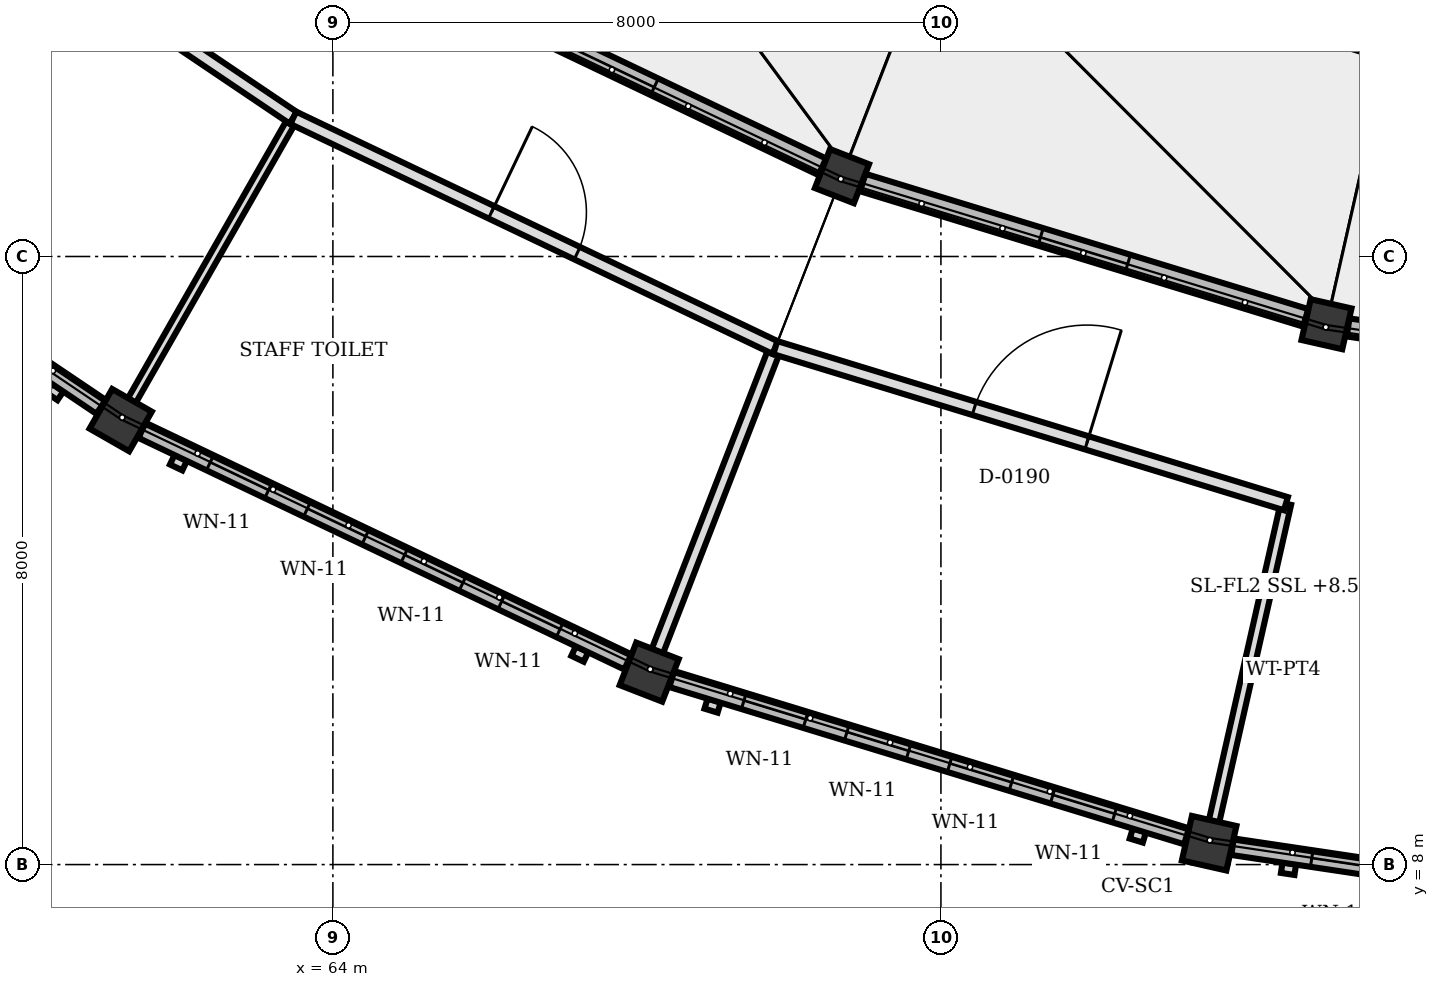
"""IFC4 building model, lengths in metres.
Left out: names, types, materials, properties, quantities, classifications, styles, units other than length and angle.
Written with IfcOpenShell. Run it as: python <this file> out.ifc"""

import sys

from ifc_helpers import new_model, si_unit, direction, frame, frame_2d, origin, origin_2d, place, context, subcontext, project, spatial, rectangle, extrude, element, fill, save


model = new_model("IFC4")
c1 = context("Model", 3, precision=1e-05, world=origin(), true_north=direction((0.0, 1.0)))
c2 = subcontext(c1, "Body", "Model", "MODEL_VIEW")
j1 = project(units=[si_unit("LENGTHUNIT", "METRE"), si_unit("PLANEANGLEUNIT", "RADIAN")], contexts=[c1])
p1 = place(None, origin())
s1 = spatial("IfcSite", under=j1, at=p1, CompositionType="ELEMENT")
p2 = place(p1, origin())
s2 = spatial("IfcBuilding", under=s1, at=p2, CompositionType="ELEMENT")
p3 = place(p2, frame((0.0, 0.0, 8.5)))
s3 = spatial("IfcBuildingStorey", under=s2, at=p3, CompositionType="ELEMENT", Elevation=8.5)
for number, where, z_axis, x_axis in (
    (1, (70.698, 17.057, 0.0), (0.0, 0.0, 1.0), (-0.362, -0.932, 0.0)),
    (2, (77.073, 15.109, 0.0), (0.0, 0.0, 1.0), (-0.221, -0.975, 0.0)),
):
    element("IfcColumn", number, at=place(p3, frame(where, z_axis=z_axis, x_axis=x_axis)), inside=s3, PredefinedType="COLUMN", context=c2, shape_type="SweptSolid", body=[
        extrude(rectangle(XDim=0.55, YDim=0.55, at=origin_2d()), origin(), (0.0, 0.0, 1.0), 4.0),
    ])
for number, where, z_axis, x_axis in (
    (3, (61.208, 13.847, 0.0), (0.0, 0.0, 1.0), (-0.496, -0.868, 0.0)),
    (4, (68.162, 10.532, 0.0), (0.0, 0.0, 1.0), (-0.362, -0.932, 0.0)),
    (5, (75.529, 8.281, 0.0), (0.0, 0.0, 1.0), (-0.221, -0.975, 0.0)),
):
    element("IfcColumn", number, at=place(p3, frame(where, z_axis=z_axis, x_axis=x_axis)), inside=s3, PredefinedType="COLUMN", context=c2, shape_type="SweptSolid", body=[
        extrude(rectangle(XDim=0.6, YDim=0.6, at=origin_2d()), origin(), (0.0, 0.0, 1.0), 4.0),
    ])
p4 = place(p3, frame((60.95, 14.021, 0.0), z_axis=(0.0, 0.0, 1.0), x_axis=(-0.829217797208, 0.558925616512, 0.0)))
e6 = element("IfcWall", 6, at=p4, inside=s3, PredefinedType="SOLIDWALL", context=c2, shape_type="SweptSolid", body=[
    extrude(rectangle(XDim=7.082, YDim=0.22, at=frame_2d((3.541, 0.0))), origin(), (0.0, 0.0, 1.0), 3.192),
])
p5 = place(p4, frame((0.991, 0.0, 0.85)))
e7 = element("IfcOpeningElement", 7, at=p5, cuts=e6, PredefinedType="OPENING", context=c2, shape_type="SweptSolid", body=[
    extrude(rectangle(XDim=0.85, YDim=1.25, at=frame_2d((0.425, 0.625))), frame((0.0, 0.12, 0.0), z_axis=(0.0, -1.0, 0.0), x_axis=(1.0, 0.0, 0.0)), (0.0, 0.0, 1.0), 0.24),
])
p6 = place(p4, frame((2.408, 0.0, 0.85)))
e8 = element("IfcOpeningElement", 8, at=p6, cuts=e6, PredefinedType="OPENING", context=c2, shape_type="SweptSolid", body=[
    extrude(rectangle(XDim=0.85, YDim=1.25, at=frame_2d((0.425, 0.625))), frame((0.0, 0.12, 0.0), z_axis=(0.0, -1.0, 0.0), x_axis=(1.0, 0.0, 0.0)), (0.0, 0.0, 1.0), 0.24),
])
p7 = place(p4, frame((3.824, 0.0, 0.85)))
e9 = element("IfcOpeningElement", 9, at=p7, cuts=e6, PredefinedType="OPENING", context=c2, shape_type="SweptSolid", body=[
    extrude(rectangle(XDim=0.85, YDim=1.25, at=frame_2d((0.425, 0.625))), frame((0.0, 0.12, 0.0), z_axis=(0.0, -1.0, 0.0), x_axis=(1.0, 0.0, 0.0)), (0.0, 0.0, 1.0), 0.24),
])
p8 = place(p4, frame((5.24, 0.0, 0.85)))
e10 = element("IfcOpeningElement", 10, at=p8, cuts=e6, PredefinedType="OPENING", context=c2, shape_type="SweptSolid", body=[
    extrude(rectangle(XDim=0.85, YDim=1.25, at=frame_2d((0.425, 0.625))), frame((0.0, 0.12, 0.0), z_axis=(0.0, -1.0, 0.0), x_axis=(1.0, 0.0, 0.0)), (0.0, 0.0, 1.0), 0.24),
])
p9 = place(p3, frame((67.881, 10.666, 0.0), z_axis=(0.0, 0.0, 1.0), x_axis=(-0.902694754948, 0.430281511792, 0.0)))
e11 = element("IfcWall", 11, at=p9, inside=s3, PredefinedType="SOLIDWALL", context=c2, shape_type="SweptSolid", body=[
    extrude(rectangle(XDim=7.081, YDim=0.22, at=frame_2d((3.541, 0.0))), origin(), (0.0, 0.0, 1.0), 3.192),
])
p10 = place(p9, frame((0.991, 0.0, 0.85)))
e12 = element("IfcOpeningElement", 12, at=p10, cuts=e11, PredefinedType="OPENING", context=c2, shape_type="SweptSolid", body=[
    extrude(rectangle(XDim=0.85, YDim=1.25, at=frame_2d((0.425, 0.625))), frame((0.0, 0.12, 0.0), z_axis=(0.0, -1.0, 0.0), x_axis=(1.0, 0.0, 0.0)), (0.0, 0.0, 1.0), 0.24),
])
p11 = place(p9, frame((2.407, 0.0, 0.85)))
e13 = element("IfcOpeningElement", 13, at=p11, cuts=e11, PredefinedType="OPENING", context=c2, shape_type="SweptSolid", body=[
    extrude(rectangle(XDim=0.85, YDim=1.25, at=frame_2d((0.425, 0.625))), frame((0.0, 0.12, 0.0), z_axis=(0.0, -1.0, 0.0), x_axis=(1.0, 0.0, 0.0)), (0.0, 0.0, 1.0), 0.24),
])
p12 = place(p9, frame((3.824, 0.0, 0.85)))
e14 = element("IfcOpeningElement", 14, at=p12, cuts=e11, PredefinedType="OPENING", context=c2, shape_type="SweptSolid", body=[
    extrude(rectangle(XDim=0.85, YDim=1.25, at=frame_2d((0.425, 0.625))), frame((0.0, 0.12, 0.0), z_axis=(0.0, -1.0, 0.0), x_axis=(1.0, 0.0, 0.0)), (0.0, 0.0, 1.0), 0.24),
])
p13 = place(p9, frame((5.24, 0.0, 0.85)))
e15 = element("IfcOpeningElement", 15, at=p13, cuts=e11, PredefinedType="OPENING", context=c2, shape_type="SweptSolid", body=[
    extrude(rectangle(XDim=0.85, YDim=1.25, at=frame_2d((0.425, 0.625))), frame((0.0, 0.12, 0.0), z_axis=(0.0, -1.0, 0.0), x_axis=(1.0, 0.0, 0.0)), (0.0, 0.0, 1.0), 0.24),
])
p14 = place(p3, frame((64.939, 19.803, 0.0), z_axis=(0.0, 0.0, 1.0), x_axis=(0.90260559719, -0.430468507467, 0.0)))
e16 = element("IfcWall", 16, at=p14, inside=s3, PredefinedType="SOLIDWALL", context=c2, shape_type="SweptSolid", body=[
    extrude(rectangle(XDim=6.094, YDim=0.24, at=frame_2d((3.047, 0.0))), origin(), (0.0, 0.0, 1.0), 3.05),
])
p15 = place(p14, frame((2.447, 0.0, 2.05)))
e17 = element("IfcOpeningElement", 17, at=p15, cuts=e16, PredefinedType="OPENING", context=c2, shape_type="SweptSolid", body=[
    extrude(rectangle(XDim=1.2, YDim=0.85, at=frame_2d((0.6, 0.425))), frame((0.0, 0.13, 0.0), z_axis=(0.0, -1.0, 0.0), x_axis=(1.0, 0.0, 0.0)), (0.0, 0.0, 1.0), 0.26),
])
p16 = place(p3, frame((75.232, 8.372, 0.0), z_axis=(0.0, 0.0, 1.0), x_axis=(-0.956377793717, 0.292132702183, 0.0)))
e18 = element("IfcWall", 18, at=p16, inside=s3, PredefinedType="SOLIDWALL", context=c2, shape_type="SweptSolid", body=[
    extrude(rectangle(XDim=7.082, YDim=0.22, at=frame_2d((3.541, 0.0))), origin(), (0.0, 0.0, 1.0), 3.192),
])
p17 = place(p16, frame((0.991, 0.0, 0.85)))
e19 = element("IfcOpeningElement", 19, at=p17, cuts=e18, PredefinedType="OPENING", context=c2, shape_type="SweptSolid", body=[
    extrude(rectangle(XDim=0.85, YDim=1.25, at=frame_2d((0.425, 0.625))), frame((0.0, 0.12, 0.0), z_axis=(0.0, -1.0, 0.0), x_axis=(1.0, 0.0, 0.0)), (0.0, 0.0, 1.0), 0.24),
])
p18 = place(p16, frame((2.408, 0.0, 0.85)))
e20 = element("IfcOpeningElement", 20, at=p18, cuts=e18, PredefinedType="OPENING", context=c2, shape_type="SweptSolid", body=[
    extrude(rectangle(XDim=0.85, YDim=1.25, at=frame_2d((0.425, 0.625))), frame((0.0, 0.12, 0.0), z_axis=(0.0, -1.0, 0.0), x_axis=(1.0, 0.0, 0.0)), (0.0, 0.0, 1.0), 0.24),
])
p19 = place(p16, frame((3.824, 0.0, 0.85)))
e21 = element("IfcOpeningElement", 21, at=p19, cuts=e18, PredefinedType="OPENING", context=c2, shape_type="SweptSolid", body=[
    extrude(rectangle(XDim=0.85, YDim=1.25, at=frame_2d((0.425, 0.625))), frame((0.0, 0.12, 0.0), z_axis=(0.0, -1.0, 0.0), x_axis=(1.0, 0.0, 0.0)), (0.0, 0.0, 1.0), 0.24),
])
p20 = place(p16, frame((5.241, 0.0, 0.85)))
e22 = element("IfcOpeningElement", 22, at=p20, cuts=e18, PredefinedType="OPENING", context=c2, shape_type="SweptSolid", body=[
    extrude(rectangle(XDim=0.85, YDim=1.25, at=frame_2d((0.425, 0.625))), frame((0.0, 0.12, 0.0), z_axis=(0.0, -1.0, 0.0), x_axis=(1.0, 0.0, 0.0)), (0.0, 0.0, 1.0), 0.24),
])
p21 = place(p3, frame((70.972, 16.973, 0.0), z_axis=(0.0, 0.0, 1.0), x_axis=(0.956385158861, -0.292108589245, 0.0)))
e23 = element("IfcWall", 23, at=p21, inside=s3, PredefinedType="SOLIDWALL", context=c2, shape_type="SweptSolid", body=[
    extrude(rectangle(XDim=6.093, YDim=0.24, at=frame_2d((3.046, 0.0))), origin(), (0.0, 0.0, 1.0), 3.05),
])
p22 = place(p21, frame((2.446, 0.0, 2.05)))
e24 = element("IfcOpeningElement", 24, at=p22, cuts=e23, PredefinedType="OPENING", context=c2, shape_type="SweptSolid", body=[
    extrude(rectangle(XDim=1.2, YDim=0.85, at=frame_2d((0.6, 0.425))), frame((0.0, 0.13, 0.0), z_axis=(0.0, -1.0, 0.0), x_axis=(1.0, 0.0, 0.0)), (0.0, 0.0, 1.0), 0.26),
])
p23 = place(p3, frame((83.148, 7.143, 0.0), z_axis=(0.0, 0.0, 1.0), x_axis=(-0.989027735747, 0.147729949309, 0.0)))
e25 = element("IfcWall", 25, at=p23, inside=s3, PredefinedType="SOLIDWALL", context=c2, shape_type="SweptSolid", body=[
    extrude(rectangle(XDim=7.392, YDim=0.22, at=frame_2d((3.696, 0.0))), origin(), (0.0, 0.0, 1.0), 3.55),
])
p24 = place(p23, frame((1.053, 0.0, 0.85)))
e26 = element("IfcOpeningElement", 26, at=p24, cuts=e25, PredefinedType="OPENING", context=c2, shape_type="SweptSolid", body=[
    extrude(rectangle(XDim=0.85, YDim=1.25, at=frame_2d((0.425, 0.625))), frame((0.0, 0.12, 0.0), z_axis=(0.0, -1.0, 0.0), x_axis=(1.0, 0.0, 0.0)), (0.0, 0.0, 1.0), 0.24),
])
p25 = place(p23, frame((2.532, 0.0, 0.85)))
e27 = element("IfcOpeningElement", 27, at=p25, cuts=e25, PredefinedType="OPENING", context=c2, shape_type="SweptSolid", body=[
    extrude(rectangle(XDim=0.85, YDim=1.25, at=frame_2d((0.425, 0.625))), frame((0.0, 0.12, 0.0), z_axis=(0.0, -1.0, 0.0), x_axis=(1.0, 0.0, 0.0)), (0.0, 0.0, 1.0), 0.24),
])
p26 = place(p23, frame((4.01, 0.0, 0.85)))
e28 = element("IfcOpeningElement", 28, at=p26, cuts=e25, PredefinedType="OPENING", context=c2, shape_type="SweptSolid", body=[
    extrude(rectangle(XDim=0.85, YDim=1.25, at=frame_2d((0.425, 0.625))), frame((0.0, 0.12, 0.0), z_axis=(0.0, -1.0, 0.0), x_axis=(1.0, 0.0, 0.0)), (0.0, 0.0, 1.0), 0.24),
])
p27 = place(p23, frame((5.489, 0.0, 0.85)))
e29 = element("IfcOpeningElement", 29, at=p27, cuts=e25, PredefinedType="OPENING", context=c2, shape_type="SweptSolid", body=[
    extrude(rectangle(XDim=0.85, YDim=1.25, at=frame_2d((0.425, 0.625))), frame((0.0, 0.12, 0.0), z_axis=(0.0, -1.0, 0.0), x_axis=(1.0, 0.0, 0.0)), (0.0, 0.0, 1.0), 0.24),
])
p28 = place(p3, frame((77.357, 15.067, 0.0), z_axis=(0.0, 0.0, 1.0), x_axis=(0.989009413768, -0.147852559932, 0.0)))
e30 = element("IfcWall", 30, at=p28, inside=s3, PredefinedType="SOLIDWALL", context=c2, shape_type="SweptSolid", body=[
    extrude(rectangle(XDim=6.093, YDim=0.24, at=frame_2d((3.046, 0.0))), origin(), (0.0, 0.0, 1.0), 3.05),
])
p29 = place(p28, frame((2.446, 0.0, 2.05)))
e31 = element("IfcOpeningElement", 31, at=p29, cuts=e30, PredefinedType="OPENING", context=c2, shape_type="SweptSolid", body=[
    extrude(rectangle(XDim=1.2, YDim=0.85, at=frame_2d((0.6, 0.425))), frame((0.0, 0.13, 0.0), z_axis=(0.0, -1.0, 0.0), x_axis=(1.0, 0.0, 0.0)), (0.0, 0.0, 1.0), 0.26),
])
p30 = place(p3, frame((63.479, 17.824, 0.0), z_axis=(0.0, 0.0, 1.0), x_axis=(-0.495893608829, -0.868383284456, 0.0)))
e32 = element("IfcWall", 32, at=p30, inside=s3, PredefinedType="PARTITIONING", context=c2, shape_type="SweptSolid", body=[
    extrude(rectangle(XDim=4.287, YDim=0.12, at=frame_2d((2.144, 0.0))), origin(), (0.0, 0.0, 1.0), 3.092),
])
p31 = place(p3, frame((69.821, 14.801, 0.0), z_axis=(0.0, 0.0, 1.0), x_axis=(-0.362155011762, -0.932117882811, 0.0)))
e33 = element("IfcWall", 33, at=p31, inside=s3, PredefinedType="PARTITIONING", context=c2, shape_type="SweptSolid", body=[
    extrude(rectangle(XDim=4.288, YDim=0.16, at=frame_2d((2.144, 0.0))), origin(), (0.0, 0.0, 1.0), 3.092),
])
p32 = place(p3, frame((76.539, 12.748, 0.0), z_axis=(0.0, 0.0, 1.0), x_axis=(-0.220636592658, -0.975356085735, 0.0)))
e34 = element("IfcWall", 34, at=p32, inside=s3, PredefinedType="PARTITIONING", context=c2, shape_type="SweptSolid", body=[
    extrude(rectangle(XDim=4.288, YDim=0.14, at=frame_2d((2.144, 0.0))), origin(), (0.0, 0.0, 1.0), 3.092),
])
p33 = place(p3, frame((57.654, 21.751, 0.0), z_axis=(0.0, 0.0, 1.0), x_axis=(0.829168029301, -0.558999444709, 0.0)))
e35 = element("IfcWall", 35, at=p33, inside=s3, PredefinedType="PARTITIONING", context=c2, shape_type="SweptSolid", body=[
    extrude(rectangle(XDim=7.025, YDim=0.18, at=frame_2d((3.513, 0.0))), origin(), (0.0, 0.0, 1.0), 3.092),
])
p34 = place(p33, frame((3.023, 0.0, 0.0)))
e36 = element("IfcOpeningElement", 36, at=p34, cuts=e35, PredefinedType="OPENING", context=c2, shape_type="SweptSolid", body=[
    extrude(rectangle(XDim=0.98, YDim=2.2, at=frame_2d((0.49, 1.1))), frame((0.0, 0.1, 0.0), z_axis=(0.0, -1.0, 0.0), x_axis=(1.0, 0.0, 0.0)), (0.0, 0.0, 1.0), 0.2),
])
p35 = place(p3, frame((63.479, 17.824, 0.0), z_axis=(0.0, 0.0, 1.0), x_axis=(0.90269858831, -0.430273469625, 0.0)))
e37 = element("IfcWall", 37, at=p35, inside=s3, PredefinedType="PARTITIONING", context=c2, shape_type="SweptSolid", body=[
    extrude(rectangle(XDim=7.026, YDim=0.18, at=frame_2d((3.513, 0.0))), origin(), (0.0, 0.0, 1.0), 3.092),
])
p36 = place(p35, frame((2.888, 0.0, 0.0)))
e38 = element("IfcOpeningElement", 38, at=p36, cuts=e37, PredefinedType="OPENING", context=c2, shape_type="SweptSolid", body=[
    extrude(rectangle(XDim=1.25, YDim=2.2, at=frame_2d((0.625, 1.1))), frame((0.0, 0.1, 0.0), z_axis=(0.0, -1.0, 0.0), x_axis=(1.0, 0.0, 0.0)), (0.0, 0.0, 1.0), 0.2),
])
p37 = place(p3, frame((69.821, 14.801, 0.0), z_axis=(0.0, 0.0, 1.0), x_axis=(0.956341588058, -0.292251205218, 0.0)))
e39 = element("IfcWall", 39, at=p37, inside=s3, PredefinedType="PARTITIONING", context=c2, shape_type="SweptSolid", body=[
    extrude(rectangle(XDim=7.025, YDim=0.18, at=frame_2d((3.512, 0.0))), origin(), (0.0, 0.0, 1.0), 3.092),
])
p38 = place(p37, frame((2.737, 0.0, 0.0)))
e40 = element("IfcOpeningElement", 40, at=p38, cuts=e39, PredefinedType="OPENING", context=c2, shape_type="SweptSolid", body=[
    extrude(rectangle(XDim=1.55, YDim=2.2, at=frame_2d((0.775, 1.1))), frame((0.0, 0.1, 0.0), z_axis=(0.0, -1.0, 0.0), x_axis=(1.0, 0.0, 0.0)), (0.0, 0.0, 1.0), 0.2),
])
p39 = place(p10, origin())
e41 = element("IfcWindow", 41, at=p39, inside=s3, PartitioningType="SINGLE_PANEL", PredefinedType="WINDOW", context=c2, shape_type="SweptSolid", body=[
    extrude(rectangle(XDim=0.85, YDim=1.25, at=frame_2d((0.425, 0.625))), frame((0.0, 0.03, 0.0), z_axis=(0.0, -1.0, 0.0), x_axis=(1.0, 0.0, 0.0)), (0.0, 0.0, 1.0), 0.06),
])
fill(e12, e41)
p40 = place(p11, origin())
e42 = element("IfcWindow", 42, at=p40, inside=s3, PartitioningType="SINGLE_PANEL", PredefinedType="WINDOW", context=c2, shape_type="SweptSolid", body=[
    extrude(rectangle(XDim=0.85, YDim=1.25, at=frame_2d((0.425, 0.625))), frame((0.0, 0.03, 0.0), z_axis=(0.0, -1.0, 0.0), x_axis=(1.0, 0.0, 0.0)), (0.0, 0.0, 1.0), 0.06),
])
fill(e13, e42)
p41 = place(p12, origin())
e43 = element("IfcWindow", 43, at=p41, inside=s3, PartitioningType="SINGLE_PANEL", PredefinedType="WINDOW", context=c2, shape_type="SweptSolid", body=[
    extrude(rectangle(XDim=0.85, YDim=1.25, at=frame_2d((0.425, 0.625))), frame((0.0, 0.03, 0.0), z_axis=(0.0, -1.0, 0.0), x_axis=(1.0, 0.0, 0.0)), (0.0, 0.0, 1.0), 0.06),
])
fill(e14, e43)
p42 = place(p13, origin())
e44 = element("IfcWindow", 44, at=p42, inside=s3, PartitioningType="SINGLE_PANEL", PredefinedType="WINDOW", context=c2, shape_type="SweptSolid", body=[
    extrude(rectangle(XDim=0.85, YDim=1.25, at=frame_2d((0.425, 0.625))), frame((0.0, 0.03, 0.0), z_axis=(0.0, -1.0, 0.0), x_axis=(1.0, 0.0, 0.0)), (0.0, 0.0, 1.0), 0.06),
])
fill(e15, e44)
p43 = place(p15, origin())
e45 = element("IfcWindow", 45, at=p43, inside=s3, PartitioningType="SINGLE_PANEL", PredefinedType="WINDOW", context=c2, shape_type="SweptSolid", body=[
    extrude(rectangle(XDim=1.2, YDim=0.85, at=frame_2d((0.6, 0.425))), frame((0.0, 0.03, 0.0), z_axis=(0.0, -1.0, 0.0), x_axis=(1.0, 0.0, 0.0)), (0.0, 0.0, 1.0), 0.06),
])
fill(e17, e45)
p44 = place(p17, origin())
e46 = element("IfcWindow", 46, at=p44, inside=s3, PartitioningType="SINGLE_PANEL", PredefinedType="WINDOW", context=c2, shape_type="SweptSolid", body=[
    extrude(rectangle(XDim=0.85, YDim=1.25, at=frame_2d((0.425, 0.625))), frame((0.0, 0.03, 0.0), z_axis=(0.0, -1.0, 0.0), x_axis=(1.0, 0.0, 0.0)), (0.0, 0.0, 1.0), 0.06),
])
fill(e19, e46)
p45 = place(p18, origin())
e47 = element("IfcWindow", 47, at=p45, inside=s3, PartitioningType="SINGLE_PANEL", PredefinedType="WINDOW", context=c2, shape_type="SweptSolid", body=[
    extrude(rectangle(XDim=0.85, YDim=1.25, at=frame_2d((0.425, 0.625))), frame((0.0, 0.03, 0.0), z_axis=(0.0, -1.0, 0.0), x_axis=(1.0, 0.0, 0.0)), (0.0, 0.0, 1.0), 0.06),
])
fill(e20, e47)
p46 = place(p19, origin())
e48 = element("IfcWindow", 48, at=p46, inside=s3, PartitioningType="SINGLE_PANEL", PredefinedType="WINDOW", context=c2, shape_type="SweptSolid", body=[
    extrude(rectangle(XDim=0.85, YDim=1.25, at=frame_2d((0.425, 0.625))), frame((0.0, 0.03, 0.0), z_axis=(0.0, -1.0, 0.0), x_axis=(1.0, 0.0, 0.0)), (0.0, 0.0, 1.0), 0.06),
])
fill(e21, e48)
p47 = place(p20, origin())
e49 = element("IfcWindow", 49, at=p47, inside=s3, PartitioningType="SINGLE_PANEL", PredefinedType="WINDOW", context=c2, shape_type="SweptSolid", body=[
    extrude(rectangle(XDim=0.85, YDim=1.25, at=frame_2d((0.425, 0.625))), frame((0.0, 0.03, 0.0), z_axis=(0.0, -1.0, 0.0), x_axis=(1.0, 0.0, 0.0)), (0.0, 0.0, 1.0), 0.06),
])
fill(e22, e49)
p48 = place(p22, origin())
e50 = element("IfcWindow", 50, at=p48, inside=s3, PartitioningType="SINGLE_PANEL", PredefinedType="WINDOW", context=c2, shape_type="SweptSolid", body=[
    extrude(rectangle(XDim=1.2, YDim=0.85, at=frame_2d((0.6, 0.425))), frame((0.0, 0.03, 0.0), z_axis=(0.0, -1.0, 0.0), x_axis=(1.0, 0.0, 0.0)), (0.0, 0.0, 1.0), 0.06),
])
fill(e24, e50)
p49 = place(p27, origin())
e51 = element("IfcWindow", 51, at=p49, inside=s3, PartitioningType="SINGLE_PANEL", PredefinedType="WINDOW", context=c2, shape_type="SweptSolid", body=[
    extrude(rectangle(XDim=0.85, YDim=1.25, at=frame_2d((0.425, 0.625))), frame((0.0, 0.03, 0.0), z_axis=(0.0, -1.0, 0.0), x_axis=(1.0, 0.0, 0.0)), (0.0, 0.0, 1.0), 0.06),
])
fill(e29, e51)
p50 = place(p36, origin())
e52 = element("IfcDoor", 52, at=p50, inside=s3, OperationType="SINGLE_SWING_LEFT", PredefinedType="DOOR", context=c2, shape_type="SweptSolid", body=[
    extrude(rectangle(XDim=1.25, YDim=2.2, at=frame_2d((0.625, 1.1))), frame((0.0, 0.025, 0.0), z_axis=(0.0, -1.0, 0.0), x_axis=(1.0, 0.0, 0.0)), (0.0, 0.0, 1.0), 0.05),
])
fill(e38, e52)
p51 = place(p38, origin())
e53 = element("IfcDoor", 53, at=p51, inside=s3, OperationType="SINGLE_SWING_RIGHT", PredefinedType="DOOR", context=c2, shape_type="SweptSolid", body=[
    extrude(rectangle(XDim=1.55, YDim=2.2, at=frame_2d((0.775, 1.1))), frame((0.0, 0.025, 0.0), z_axis=(0.0, -1.0, 0.0), x_axis=(1.0, 0.0, 0.0)), (0.0, 0.0, 1.0), 0.05),
])
fill(e40, e53)
save(model, sys.argv[1])
